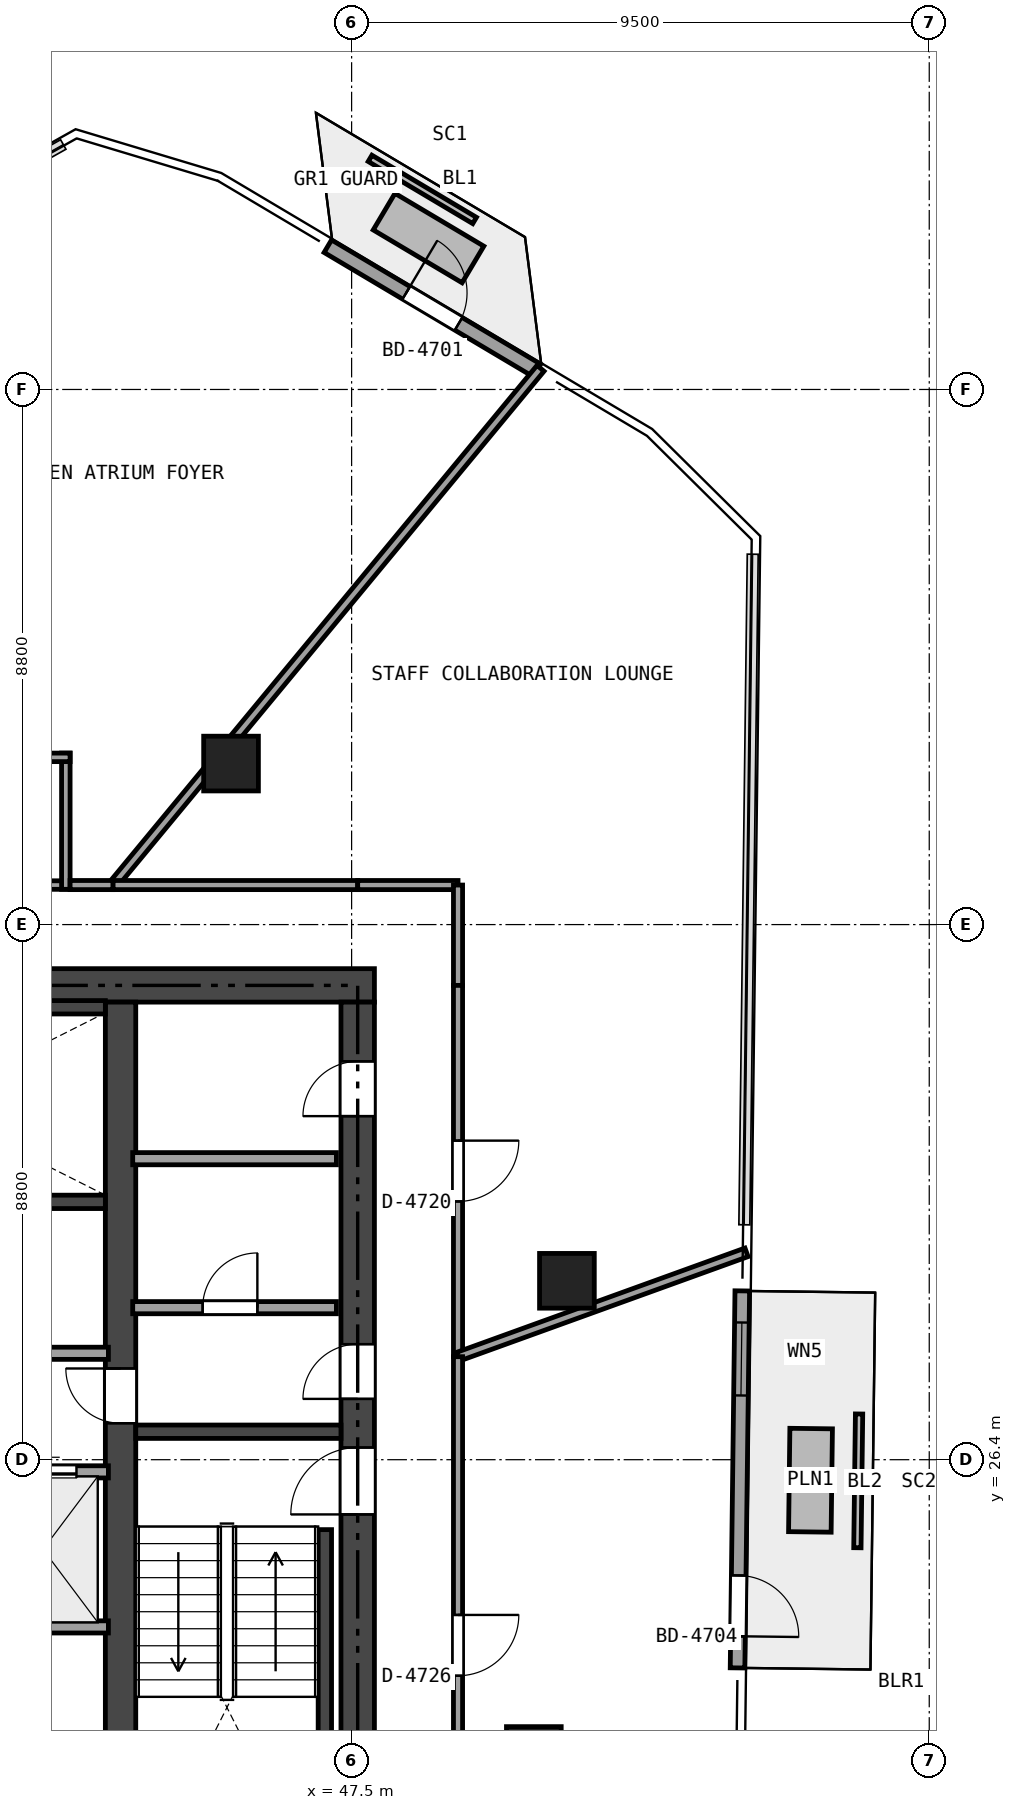
"""IFC4 building model, lengths in metres.
Left out: names, types, materials, properties, quantities, classifications, styles, units other than length and angle.
Written with IfcOpenShell. Run it as: python <this file> out.ifc"""

import sys

from ifc_helpers import new_model, si_unit, direction, frame, frame_2d, origin, origin_2d, place, context, subcontext, project, spatial, rectangle, extrude, element, fill, save


model = new_model("IFC4")
c1 = context("Model", 3, precision=1e-05, world=origin(), true_north=direction((0.0, 1.0)))
c2 = subcontext(c1, "Body", "Model", "MODEL_VIEW")
j1 = project(units=[si_unit("LENGTHUNIT", "METRE"), si_unit("PLANEANGLEUNIT", "RADIAN")], contexts=[c1])
p1 = place(None, origin())
s1 = spatial("IfcSite", under=j1, at=p1, CompositionType="ELEMENT")
p2 = place(p1, origin())
s2 = spatial("IfcBuilding", under=s1, at=p2, CompositionType="ELEMENT")
p3 = place(p2, frame((0.0, 0.0, 177.0)))
s3 = spatial("IfcBuildingStorey", under=s2, at=p3, CompositionType="ELEMENT", Elevation=177.0)
p4 = place(p3, frame((26.525, 34.2, 0.0), z_axis=(0.0, 0.0, 1.0), x_axis=(1.0, 0.0, 0.0)))
e1 = element("IfcWall", 1, at=p4, inside=s3, PredefinedType="SHEAR", context=c2, shape_type="SweptSolid", body=[
    extrude(rectangle(XDim=21.35, YDim=0.55, at=frame_2d((10.675, 0.0))), origin(), (0.0, 0.0, 1.0), 3.32),
])
p5 = place(p4, frame((9.675, 0.0, 0.0)))
e2 = element("IfcOpeningElement", 2, at=p5, cuts=e1, PredefinedType="OPENING", context=c2, shape_type="SweptSolid", body=[
    extrude(rectangle(XDim=1.1, YDim=2.15, at=frame_2d((0.55, 1.075))), frame((0.0, 0.285, 0.0), z_axis=(0.0, -1.0, 0.0), x_axis=(1.0, 0.0, 0.0)), (0.0, 0.0, 1.0), 0.57),
])
p6 = place(p4, frame((1.925, 0.0, 0.0)))
e3 = element("IfcOpeningElement", 3, at=p6, cuts=e1, PredefinedType="OPENING", context=c2, shape_type="SweptSolid", body=[
    extrude(rectangle(XDim=0.9, YDim=2.1, at=frame_2d((0.45, 1.05))), frame((0.0, 0.285, 0.0), z_axis=(0.0, -1.0, 0.0), x_axis=(1.0, 0.0, 0.0)), (0.0, 0.0, 1.0), 0.57),
])
p7 = place(p4, frame((6.225, 0.0, 0.0)))
e4 = element("IfcOpeningElement", 4, at=p7, cuts=e1, PredefinedType="OPENING", context=c2, shape_type="SweptSolid", body=[
    extrude(rectangle(XDim=0.9, YDim=2.1, at=frame_2d((0.45, 1.05))), frame((0.0, 0.285, 0.0), z_axis=(0.0, -1.0, 0.0), x_axis=(1.0, 0.0, 0.0)), (0.0, 0.0, 1.0), 0.57),
])
p8 = place(p3, frame((47.6, 18.875, 0.0), z_axis=(0.0, 0.0, 1.0), x_axis=(0.0, 1.0, 0.0)))
e5 = element("IfcWall", 5, at=p8, inside=s3, PredefinedType="SHEAR", context=c2, shape_type="SweptSolid", body=[
    extrude(rectangle(XDim=15.05, YDim=0.55, at=frame_2d((7.525, 0.0))), origin(), (0.0, 0.0, 1.0), 3.32),
])
p9 = place(p8, frame((6.625, 0.0, 0.0)))
e6 = element("IfcOpeningElement", 6, at=p9, cuts=e5, PredefinedType="OPENING", context=c2, shape_type="SweptSolid", body=[
    extrude(rectangle(XDim=1.1, YDim=2.15, at=frame_2d((0.55, 1.075))), frame((0.0, 0.285, 0.0), z_axis=(0.0, -1.0, 0.0), x_axis=(1.0, 0.0, 0.0)), (0.0, 0.0, 1.0), 0.57),
])
p10 = place(p8, frame((8.525, 0.0, 0.0)))
e7 = element("IfcOpeningElement", 7, at=p10, cuts=e5, PredefinedType="OPENING", context=c2, shape_type="SweptSolid", body=[
    extrude(rectangle(XDim=0.9, YDim=2.1, at=frame_2d((0.45, 1.05))), frame((0.0, 0.285, 0.0), z_axis=(0.0, -1.0, 0.0), x_axis=(1.0, 0.0, 0.0)), (0.0, 0.0, 1.0), 0.57),
])
p11 = place(p8, frame((13.175, 0.0, 0.0)))
e8 = element("IfcOpeningElement", 8, at=p11, cuts=e5, PredefinedType="OPENING", context=c2, shape_type="SweptSolid", body=[
    extrude(rectangle(XDim=0.9, YDim=2.1, at=frame_2d((0.45, 1.05))), frame((0.0, 0.285, 0.0), z_axis=(0.0, -1.0, 0.0), x_axis=(1.0, 0.0, 0.0)), (0.0, 0.0, 1.0), 0.57),
])
p12 = place(p3, frame((43.7, 18.875, 0.0), z_axis=(0.0, 0.0, 1.0), x_axis=(0.0, 1.0, 0.0)))
e9 = element("IfcWall", 9, at=p12, inside=s3, PredefinedType="SHEAR", context=c2, shape_type="SweptSolid", body=[
    extrude(rectangle(XDim=15.05, YDim=0.5, at=frame_2d((7.525, 0.0))), origin(), (0.0, 0.0, 1.0), 3.32),
])
p13 = place(p12, frame((8.125, 0.0, 0.0)))
e10 = element("IfcOpeningElement", 10, at=p13, cuts=e9, PredefinedType="OPENING", context=c2, shape_type="SweptSolid", body=[
    extrude(rectangle(XDim=0.9, YDim=2.1, at=frame_2d((0.45, 1.05))), frame((0.0, 0.26, 0.0), z_axis=(0.0, -1.0, 0.0), x_axis=(1.0, 0.0, 0.0)), (0.0, 0.0, 1.0), 0.52),
])
p14 = place(p3, frame((43.95, 26.86, 0.0), z_axis=(0.0, 0.0, 1.0), x_axis=(1.0, 0.0, 0.0)))
e11 = element("IfcWall", 11, at=p14, inside=s3, PredefinedType="SHEAR", context=c2, shape_type="SweptSolid", body=[
    extrude(rectangle(XDim=3.375, YDim=0.22, at=frame_2d((1.688, 0.0))), origin(), (0.0, 0.0, 1.0), 3.32),
])
p15 = place(p3, frame((47.06, 19.35, 0.0), z_axis=(0.0, 0.0, 1.0), x_axis=(0.0, 1.0, 0.0)))
e12 = element("IfcWall", 12, at=p15, inside=s3, PredefinedType="SHEAR", context=c2, shape_type="SweptSolid", body=[
    extrude(rectangle(XDim=5.9, YDim=0.22, at=frame_2d((2.95, 0.0))), origin(), (0.0, 0.0, 1.0), 3.32),
])
p16 = place(p3, frame((35.84, 30.64, 0.0), z_axis=(0.0, 0.0, 1.0), x_axis=(1.0, 0.0, 0.0)))
e13 = element("IfcWall", 13, at=p16, inside=s3, PredefinedType="SHEAR", context=c2, shape_type="SweptSolid", body=[
    extrude(rectangle(XDim=7.61, YDim=0.22, at=frame_2d((3.805, 0.0))), origin(), (0.0, 0.0, 1.0), 3.32),
])
p17 = place(p3, frame((37.55, 33.84, 0.0), z_axis=(0.0, 0.0, 1.0), x_axis=(1.0, 0.0, 0.0)))
e14 = element("IfcWall", 14, at=p17, inside=s3, PredefinedType="SHEAR", context=c2, shape_type="SweptSolid", body=[
    extrude(rectangle(XDim=5.9, YDim=0.22, at=frame_2d((2.95, 0.0))), origin(), (0.0, 0.0, 1.0), 3.32),
])
for number, where, z_axis, x_axis in (
    (15, (51.041, 29.342, -0.405), (0.0, 0.0, 1.0), (1.0, 0.0, 0.0)),
    (16, (45.517, 37.848, -0.405), (0.0, 0.0, 1.0), (1.0, 0.0, 0.0)),
    (17, (50.497, 21.56, -0.405), (0.0, 0.0, 1.0), (1.0, 0.0, 0.0)),
):
    element("IfcColumn", number, at=place(p3, frame(where, z_axis=z_axis, x_axis=x_axis)), inside=s3, PredefinedType="COLUMN", context=c2, shape_type="SweptSolid", body=[
        extrude(rectangle(XDim=0.9, YDim=0.9, at=origin_2d()), origin(), (0.0, 0.0, 1.0), 3.725),
    ])
p18 = place(p3, frame((47.109, 46.356, 0.0), z_axis=(0.0, 0.0, 1.0), x_axis=(0.859751743834, -0.510712188003, 0.0)))
e18 = element("IfcWall", 18, at=p18, inside=s3, PredefinedType="SOLIDWALL", context=c2, shape_type="SweptSolid", body=[
    extrude(rectangle(XDim=4.0, YDim=0.24, at=frame_2d((2.0, 0.0))), origin(), (0.0, 0.0, 1.0), 3.32),
])
p19 = place(p18, frame((1.5, 0.0, 0.0)))
e19 = element("IfcOpeningElement", 19, at=p19, cuts=e18, PredefinedType="OPENING", context=c2, shape_type="SweptSolid", body=[
    extrude(rectangle(XDim=1.0, YDim=2.15, at=frame_2d((0.5, 1.075))), frame((0.0, 0.13, 0.0), z_axis=(0.0, -1.0, 0.0), x_axis=(1.0, 0.0, 0.0)), (0.0, 0.0, 1.0), 0.26),
])
p20 = place(p3, frame((53.925, 29.176, 0.0), z_axis=(0.0, 0.0, 1.0), x_axis=(-0.012599905406, -0.999920618041, 0.0)))
e20 = element("IfcWall", 20, at=p20, inside=s3, PredefinedType="SOLIDWALL", context=c2, shape_type="SweptSolid", body=[
    extrude(rectangle(XDim=6.2, YDim=0.24, at=frame_2d((3.1, 0.0))), origin(), (0.0, 0.0, 1.0), 3.32),
])
p21 = place(p20, frame((4.68, 0.0, 0.0)))
e21 = element("IfcOpeningElement", 21, at=p21, cuts=e20, PredefinedType="OPENING", context=c2, shape_type="SweptSolid", body=[
    extrude(rectangle(XDim=1.0, YDim=2.15, at=frame_2d((0.5, 1.075))), frame((0.0, 0.13, 0.0), z_axis=(0.0, -1.0, 0.0), x_axis=(1.0, 0.0, 0.0)), (0.0, 0.0, 1.0), 0.26),
])
p22 = place(p20, frame((0.52, 0.0, 0.2)))
e22 = element("IfcOpeningElement", 22, at=p22, cuts=e20, PredefinedType="OPENING", context=c2, shape_type="SweptSolid", body=[
    extrude(rectangle(XDim=1.2, YDim=1.8, at=frame_2d((0.6, 0.9))), frame((0.0, 0.13, 0.0), z_axis=(0.0, -1.0, 0.0), x_axis=(1.0, 0.0, 0.0)), (0.0, 0.0, 1.0), 0.26),
])
p23 = place(p3, frame((43.9, 28.9, 0.0), z_axis=(0.0, 0.0, 1.0), x_axis=(1.0, 0.0, 0.0)))
e23 = element("IfcWall", 23, at=p23, inside=s3, PredefinedType="SOLIDWALL", context=c2, shape_type="SweptSolid", body=[
    extrude(rectangle(XDim=3.35, YDim=0.2, at=frame_2d((1.675, 0.0))), origin(), (0.0, 0.0, 1.0), 3.32),
])
p24 = place(p23, frame((1.15, 0.0, 0.0)))
e24 = element("IfcOpeningElement", 24, at=p24, cuts=e23, PredefinedType="OPENING", context=c2, shape_type="SweptSolid", body=[
    extrude(rectangle(XDim=0.9, YDim=2.1, at=frame_2d((0.45, 1.05))), frame((0.0, 0.11, 0.0), z_axis=(0.0, -1.0, 0.0), x_axis=(1.0, 0.0, 0.0)), (0.0, 0.0, 1.0), 0.22),
])
p25 = place(p3, frame((43.9, 31.35, 0.0), z_axis=(0.0, 0.0, 1.0), x_axis=(1.0, 0.0, 0.0)))
e25 = element("IfcWall", 25, at=p25, inside=s3, PredefinedType="SOLIDWALL", context=c2, shape_type="SweptSolid", body=[
    extrude(rectangle(XDim=3.35, YDim=0.2, at=frame_2d((1.675, 0.0))), origin(), (0.0, 0.0, 1.0), 3.32),
])
p26 = place(p3, frame((35.62, 28.15, 0.0), z_axis=(0.0, 0.0, 1.0), x_axis=(1.0, 0.0, 0.0)))
e26 = element("IfcWall", 26, at=p26, inside=s3, PredefinedType="SOLIDWALL", context=c2, shape_type="SweptSolid", body=[
    extrude(rectangle(XDim=7.88, YDim=0.2, at=frame_2d((3.94, 0.0))), origin(), (0.0, 0.0, 1.0), 3.32),
])
p27 = place(p3, frame((35.62, 26.2, 0.0), z_axis=(0.0, 0.0, 1.0), x_axis=(1.0, 0.0, 0.0)))
e27 = element("IfcWall", 27, at=p27, inside=s3, PredefinedType="SOLIDWALL", context=c2, shape_type="SweptSolid", body=[
    extrude(rectangle(XDim=7.88, YDim=0.2, at=frame_2d((3.94, 0.0))), origin(), (0.0, 0.0, 1.0), 3.32),
])
p28 = place(p27, frame((0.405, 0.0, 0.0)))
e28 = element("IfcOpeningElement", 28, at=p28, cuts=e27, PredefinedType="OPENING", context=c2, shape_type="SweptSolid", body=[
    extrude(rectangle(XDim=1.1, YDim=2.15, at=frame_2d((0.55, 1.075))), frame((0.0, 0.11, 0.0), z_axis=(0.0, -1.0, 0.0), x_axis=(1.0, 0.0, 0.0)), (0.0, 0.0, 1.0), 0.22),
])
p29 = place(p27, frame((2.355, 0.0, 0.0)))
e29 = element("IfcOpeningElement", 29, at=p29, cuts=e27, PredefinedType="OPENING", context=c2, shape_type="SweptSolid", body=[
    extrude(rectangle(XDim=1.1, YDim=2.15, at=frame_2d((0.55, 1.075))), frame((0.0, 0.11, 0.0), z_axis=(0.0, -1.0, 0.0), x_axis=(1.0, 0.0, 0.0)), (0.0, 0.0, 1.0), 0.22),
])
p30 = place(p27, frame((4.305, 0.0, 0.0)))
e30 = element("IfcOpeningElement", 30, at=p30, cuts=e27, PredefinedType="OPENING", context=c2, shape_type="SweptSolid", body=[
    extrude(rectangle(XDim=1.1, YDim=2.15, at=frame_2d((0.55, 1.075))), frame((0.0, 0.11, 0.0), z_axis=(0.0, -1.0, 0.0), x_axis=(1.0, 0.0, 0.0)), (0.0, 0.0, 1.0), 0.22),
])
p31 = place(p27, frame((6.255, 0.0, 0.0)))
e31 = element("IfcOpeningElement", 31, at=p31, cuts=e27, PredefinedType="OPENING", context=c2, shape_type="SweptSolid", body=[
    extrude(rectangle(XDim=1.1, YDim=2.15, at=frame_2d((0.55, 1.075))), frame((0.0, 0.11, 0.0), z_axis=(0.0, -1.0, 0.0), x_axis=(1.0, 0.0, 0.0)), (0.0, 0.0, 1.0), 0.22),
])
p32 = place(p3, frame((35.62, 23.65, 0.0), z_axis=(0.0, 0.0, 1.0), x_axis=(1.0, 0.0, 0.0)))
e32 = element("IfcWall", 32, at=p32, inside=s3, PredefinedType="SOLIDWALL", context=c2, shape_type="SweptSolid", body=[
    extrude(rectangle(XDim=7.88, YDim=0.2, at=frame_2d((3.94, 0.0))), origin(), (0.0, 0.0, 1.0), 2.841),
])
p33 = place(p3, frame((40.43, 35.85, 0.0), z_axis=(0.0, 0.0, 1.0), x_axis=(1.0, 0.0, 0.0)))
e33 = element("IfcWall", 33, at=p33, inside=s3, PredefinedType="PARTITIONING", context=c2, shape_type="SweptSolid", body=[
    extrude(rectangle(XDim=2.44, YDim=0.14, at=frame_2d((1.22, 0.0))), origin(), (0.0, 0.0, 1.0), 2.841),
])
p34 = place(p33, frame((0.76, 0.0, 0.0)))
e34 = element("IfcOpeningElement", 34, at=p34, cuts=e33, PredefinedType="OPENING", context=c2, shape_type="SweptSolid", body=[
    extrude(rectangle(XDim=0.92, YDim=2.1, at=frame_2d((0.46, 1.05))), frame((0.0, 0.08, 0.0), z_axis=(0.0, -1.0, 0.0), x_axis=(1.0, 0.0, 0.0)), (0.0, 0.0, 1.0), 0.16),
])
p35 = place(p3, frame((42.8, 35.78, 0.0), z_axis=(0.0, 0.0, 1.0), x_axis=(0.0, 1.0, 0.0)))
e35 = element("IfcWall", 35, at=p35, inside=s3, PredefinedType="PARTITIONING", context=c2, shape_type="SweptSolid", body=[
    extrude(rectangle(XDim=2.24, YDim=0.14, at=frame_2d((1.12, 0.0))), origin(), (0.0, 0.0, 1.0), 2.949),
])
p36 = place(p3, frame((42.87, 37.95, 0.0), z_axis=(0.0, 0.0, 1.0), x_axis=(-1.0, 0.0, 0.0)))
e36 = element("IfcWall", 36, at=p36, inside=s3, PredefinedType="PARTITIONING", context=c2, shape_type="SweptSolid", body=[
    extrude(rectangle(XDim=2.44, YDim=0.14, at=frame_2d((1.22, 0.0))), origin(), (0.0, 0.0, 1.0), 2.841),
])
p37 = place(p3, frame((50.607, 44.348, 0.0), z_axis=(0.0, 0.0, 1.0), x_axis=(-0.637583567769, -0.770381200518, 0.0)))
e37 = element("IfcWall", 37, at=p37, inside=s3, PredefinedType="PARTITIONING", context=c2, shape_type="SweptSolid", body=[
    extrude(rectangle(XDim=11.031, YDim=0.15, at=frame_2d((5.515, 0.0))), origin(), (0.0, 0.0, 1.0), 2.949),
])
p38 = place(p3, frame((43.574, 35.85, 0.0), z_axis=(0.0, 0.0, 1.0), x_axis=(1.0, 0.0, 0.0)))
e38 = element("IfcWall", 38, at=p38, inside=s3, PredefinedType="PARTITIONING", context=c2, shape_type="SweptSolid", body=[
    extrude(rectangle(XDim=4.026, YDim=0.15, at=frame_2d((2.013, 0.0))), origin(), (0.0, 0.0, 1.0), 2.697),
])
p39 = place(p3, frame((47.6, 35.85, 0.0), z_axis=(0.0, 0.0, 1.0), x_axis=(1.0, 0.0, 0.0)))
e39 = element("IfcWall", 39, at=p39, inside=s3, PredefinedType="PARTITIONING", context=c2, shape_type="SweptSolid", body=[
    extrude(rectangle(XDim=1.65, YDim=0.15, at=frame_2d((0.825, 0.0))), origin(), (0.0, 0.0, 1.0), 3.32),
])
p40 = place(p3, frame((49.25, 35.85, 0.0), z_axis=(0.0, 0.0, 1.0), x_axis=(0.0, -1.0, 0.0)))
e40 = element("IfcWall", 40, at=p40, inside=s3, PredefinedType="PARTITIONING", context=c2, shape_type="SweptSolid", body=[
    extrude(rectangle(XDim=1.65, YDim=0.15, at=frame_2d((0.825, 0.0))), origin(), (0.0, 0.0, 1.0), 3.32),
])
p41 = place(p3, frame((49.25, 34.2, 0.0), z_axis=(0.0, 0.0, 1.0), x_axis=(0.0, -1.0, 0.0)))
e41 = element("IfcWall", 41, at=p41, inside=s3, PredefinedType="PARTITIONING", context=c2, shape_type="SweptSolid", body=[
    extrude(rectangle(XDim=6.106, YDim=0.15, at=frame_2d((3.053, 0.0))), origin(), (0.0, 0.0, 1.0), 2.697),
])
p42 = place(p41, frame((2.553, 0.0, 0.0)))
e42 = element("IfcOpeningElement", 42, at=p42, cuts=e41, PredefinedType="OPENING", context=c2, shape_type="SweptSolid", body=[
    extrude(rectangle(XDim=1.0, YDim=2.15, at=frame_2d((0.5, 1.075))), frame((0.0, 0.085, 0.0), z_axis=(0.0, -1.0, 0.0), x_axis=(1.0, 0.0, 0.0)), (0.0, 0.0, 1.0), 0.17),
])
p43 = place(p3, frame((49.25, 28.094, 0.0), z_axis=(0.0, 0.0, 1.0), x_axis=(0.940392359165, 0.340091474201, 0.0)))
e43 = element("IfcWall", 43, at=p43, inside=s3, PredefinedType="PARTITIONING", context=c2, shape_type="SweptSolid", body=[
    extrude(rectangle(XDim=5.046, YDim=0.15, at=frame_2d((2.523, 0.0))), origin(), (0.0, 0.0, 1.0), 2.905),
])
p44 = place(p3, frame((42.87, 35.85, 0.0), z_axis=(0.0, 0.0, 1.0), x_axis=(1.0, 0.0, 0.0)))
e44 = element("IfcWall", 44, at=p44, inside=s3, PredefinedType="PARTITIONING", context=c2, shape_type="SweptSolid", body=[
    extrude(rectangle(XDim=0.704, YDim=0.15, at=frame_2d((0.352, 0.0))), origin(), (0.0, 0.0, 1.0), 3.32),
])
p45 = place(p3, frame((49.25, 28.094, 0.0), z_axis=(0.0, 0.0, 1.0), x_axis=(0.0, -1.0, 0.0)))
e45 = element("IfcWall", 45, at=p45, inside=s3, PredefinedType="PARTITIONING", context=c2, shape_type="SweptSolid", body=[
    extrude(rectangle(XDim=9.494, YDim=0.15, at=frame_2d((4.747, 0.0))), origin(), (0.0, 0.0, 1.0), 2.697),
])
p46 = place(p45, frame((4.247, 0.0, 0.0)))
e46 = element("IfcOpeningElement", 46, at=p46, cuts=e45, PredefinedType="OPENING", context=c2, shape_type="SweptSolid", body=[
    extrude(rectangle(XDim=1.0, YDim=2.15, at=frame_2d((0.5, 1.075))), frame((0.0, 0.085, 0.0), z_axis=(0.0, -1.0, 0.0), x_axis=(1.0, 0.0, 0.0)), (0.0, 0.0, 1.0), 0.17),
])
p47 = place(p19, origin())
e47 = element("IfcDoor", 47, at=p47, inside=s3, OperationType="SINGLE_SWING_LEFT", PredefinedType="DOOR", context=c2, shape_type="SweptSolid", body=[
    extrude(rectangle(XDim=1.0, YDim=2.15, at=frame_2d((0.5, 1.075))), frame((0.0, 0.025, 0.0), z_axis=(0.0, -1.0, 0.0), x_axis=(1.0, 0.0, 0.0)), (0.0, 0.0, 1.0), 0.05),
])
fill(e19, e47)
p48 = place(p21, origin())
e48 = element("IfcDoor", 48, at=p48, inside=s3, OperationType="SINGLE_SWING_RIGHT", PredefinedType="DOOR", context=c2, shape_type="SweptSolid", body=[
    extrude(rectangle(XDim=1.0, YDim=2.15, at=frame_2d((0.5, 1.075))), frame((0.0, 0.025, 0.0), z_axis=(0.0, -1.0, 0.0), x_axis=(1.0, 0.0, 0.0)), (0.0, 0.0, 1.0), 0.05),
])
fill(e21, e48)
p49 = place(p22, origin())
e49 = element("IfcWindow", 49, at=p49, inside=s3, PartitioningType="SINGLE_PANEL", PredefinedType="WINDOW", context=c2, shape_type="SweptSolid", body=[
    extrude(rectangle(XDim=1.2, YDim=1.8, at=frame_2d((0.6, 0.9))), frame((0.0, 0.03, 0.0), z_axis=(0.0, -1.0, 0.0), x_axis=(1.0, 0.0, 0.0)), (0.0, 0.0, 1.0), 0.06),
])
fill(e22, e49)
p50 = place(p9, origin())
e50 = element("IfcDoor", 50, at=p50, inside=s3, OperationType="SINGLE_SWING_LEFT", PredefinedType="DOOR", context=c2, shape_type="SweptSolid", body=[
    extrude(rectangle(XDim=1.1, YDim=2.15, at=frame_2d((0.55, 1.075))), frame((0.0, 0.025, 0.0), z_axis=(0.0, -1.0, 0.0), x_axis=(1.0, 0.0, 0.0)), (0.0, 0.0, 1.0), 0.05),
])
fill(e6, e50)
p51 = place(p13, origin())
e51 = element("IfcDoor", 51, at=p51, inside=s3, OperationType="SINGLE_SWING_RIGHT", PredefinedType="DOOR", context=c2, shape_type="SweptSolid", body=[
    extrude(rectangle(XDim=0.9, YDim=2.1, at=frame_2d((0.45, 1.05))), frame((0.0, 0.025, 0.0), z_axis=(0.0, -1.0, 0.0), x_axis=(1.0, 0.0, 0.0)), (0.0, 0.0, 1.0), 0.05),
])
fill(e10, e51)
p52 = place(p10, origin())
e52 = element("IfcDoor", 52, at=p52, inside=s3, OperationType="SINGLE_SWING_LEFT", PredefinedType="DOOR", context=c2, shape_type="SweptSolid", body=[
    extrude(rectangle(XDim=0.9, YDim=2.1, at=frame_2d((0.45, 1.05))), frame((0.0, 0.025, 0.0), z_axis=(0.0, -1.0, 0.0), x_axis=(1.0, 0.0, 0.0)), (0.0, 0.0, 1.0), 0.05),
])
fill(e7, e52)
p53 = place(p24, origin())
e53 = element("IfcDoor", 53, at=p53, inside=s3, OperationType="SINGLE_SWING_RIGHT", PredefinedType="DOOR", context=c2, shape_type="SweptSolid", body=[
    extrude(rectangle(XDim=0.9, YDim=2.1, at=frame_2d((0.45, 1.05))), frame((0.0, 0.025, 0.0), z_axis=(0.0, -1.0, 0.0), x_axis=(1.0, 0.0, 0.0)), (0.0, 0.0, 1.0), 0.05),
])
fill(e24, e53)
p54 = place(p11, origin())
e54 = element("IfcDoor", 54, at=p54, inside=s3, OperationType="SINGLE_SWING_LEFT", PredefinedType="DOOR", context=c2, shape_type="SweptSolid", body=[
    extrude(rectangle(XDim=0.9, YDim=2.1, at=frame_2d((0.45, 1.05))), frame((0.0, 0.025, 0.0), z_axis=(0.0, -1.0, 0.0), x_axis=(1.0, 0.0, 0.0)), (0.0, 0.0, 1.0), 0.05),
])
fill(e8, e54)
p55 = place(p31, origin())
e55 = element("IfcDoor", 55, at=p55, inside=s3, OperationType="SLIDING_TO_LEFT", PredefinedType="DOOR", context=c2, shape_type="SweptSolid", body=[
    extrude(rectangle(XDim=1.1, YDim=2.15, at=frame_2d((0.55, 1.075))), frame((0.0, 0.025, 0.0), z_axis=(0.0, -1.0, 0.0), x_axis=(1.0, 0.0, 0.0)), (0.0, 0.0, 1.0), 0.05),
])
fill(e31, e55)
p56 = place(p42, origin())
e56 = element("IfcDoor", 56, at=p56, inside=s3, OperationType="SINGLE_SWING_LEFT", PredefinedType="DOOR", context=c2, shape_type="SweptSolid", body=[
    extrude(rectangle(XDim=1.0, YDim=2.15, at=frame_2d((0.5, 1.075))), frame((0.0, 0.025, 0.0), z_axis=(0.0, -1.0, 0.0), x_axis=(1.0, 0.0, 0.0)), (0.0, 0.0, 1.0), 0.05),
])
fill(e42, e56)
p57 = place(p46, origin())
e57 = element("IfcDoor", 57, at=p57, inside=s3, OperationType="SINGLE_SWING_LEFT", PredefinedType="DOOR", context=c2, shape_type="SweptSolid", body=[
    extrude(rectangle(XDim=1.0, YDim=2.15, at=frame_2d((0.5, 1.075))), frame((0.0, 0.025, 0.0), z_axis=(0.0, -1.0, 0.0), x_axis=(1.0, 0.0, 0.0)), (0.0, 0.0, 1.0), 0.05),
])
fill(e46, e57)
save(model, sys.argv[1])
